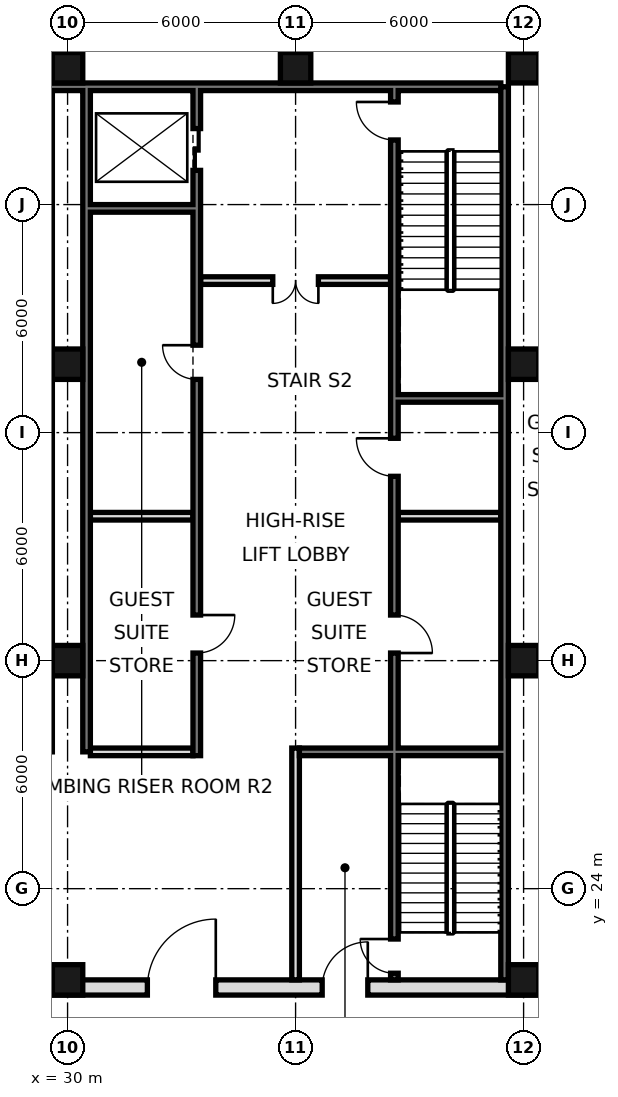
"""IFC4 building model, lengths in metres.
Left out: names, types, materials, properties, quantities, classifications, styles, units other than length and angle.
Written with IfcOpenShell. Run it as: python <this file> out.ifc"""

import sys

from ifc_helpers import new_model, si_unit, direction, frame, frame_2d, origin, origin_2d, place, context, subcontext, project, spatial, rectangle, hollow_rectangle, extrude, element, fill, save


model = new_model("IFC4")
c1 = context("Model", 3, precision=1e-05, world=origin(), true_north=direction((0.0, 1.0)))
c2 = subcontext(c1, "Body", "Model", "MODEL_VIEW")
j1 = project(units=[si_unit("LENGTHUNIT", "METRE"), si_unit("PLANEANGLEUNIT", "RADIAN")], contexts=[c1])
p1 = place(None, origin())
s1 = spatial("IfcSite", under=j1, at=p1, CompositionType="ELEMENT")
p2 = place(p1, origin())
s2 = spatial("IfcBuilding", under=s1, at=p2, CompositionType="ELEMENT")
p3 = place(p2, frame((0.0, 0.0, 30.0)))
s3 = spatial("IfcBuildingStorey", under=s2, at=p3, CompositionType="ELEMENT", Elevation=30.0)
for number, where, z_axis, x_axis in (
    (1, (30.0, 21.6, 0.0), (0.0, 0.0, 1.0), (1.0, 0.0, 0.0)),
    (2, (30.0, 30.0, 0.0), (0.0, 0.0, 1.0), (1.0, 0.0, 0.0)),
    (3, (30.0, 37.8, 0.0), (0.0, 0.0, 1.0), (1.0, 0.0, 0.0)),
    (4, (30.0, 45.6, 0.0), (0.0, 0.0, 1.0), (1.0, 0.0, 0.0)),
    (5, (36.0, 45.6, 0.0), (0.0, 0.0, 1.0), (1.0, 0.0, 0.0)),
    (6, (42.0, 21.6, 0.0), (0.0, 0.0, 1.0), (1.0, 0.0, 0.0)),
    (7, (42.0, 30.0, 0.0), (0.0, 0.0, 1.0), (1.0, 0.0, 0.0)),
    (8, (42.0, 37.8, 0.0), (0.0, 0.0, 1.0), (1.0, 0.0, 0.0)),
    (9, (42.0, 45.6, 0.0), (0.0, 0.0, 1.0), (1.0, 0.0, 0.0)),
):
    element("IfcColumn", number, at=place(p3, frame(where, z_axis=z_axis, x_axis=x_axis)), inside=s3, PredefinedType="COLUMN", context=c2, shape_type="SweptSolid", body=[
        extrude(hollow_rectangle(XDim=0.8, YDim=0.8, WallThickness=0.07, at=origin_2d()), origin(), (0.0, 0.0, 1.0), 4.8),
    ])
p4 = place(p3, frame((41.5, 21.6, 0.0), z_axis=(0.0, 0.0, 1.0), x_axis=(0.0, 1.0, 0.0)))
e10 = element("IfcWall", 10, at=p4, inside=s3, PredefinedType="SOLIDWALL", context=c2, shape_type="SweptSolid", body=[
    extrude(rectangle(XDim=23.5, YDim=0.2, at=frame_2d((11.75, 0.0))), origin(), (0.0, 0.0, 1.0), 4.4),
])
p5 = place(p3, frame((6.6, 45.1, 0.0), z_axis=(0.0, 0.0, 1.0), x_axis=(1.0, 0.0, 0.0)))
e11 = element("IfcWall", 11, at=p5, inside=s3, PredefinedType="SOLIDWALL", context=c2, shape_type="SweptSolid", body=[
    extrude(rectangle(XDim=34.8, YDim=0.2, at=frame_2d((17.4, 0.0))), origin(), (0.0, 0.0, 1.0), 4.4),
])
p6 = place(p3, frame((30.5, 27.6, 0.0), z_axis=(0.0, 0.0, 1.0), x_axis=(0.0, 1.0, 0.0)))
e12 = element("IfcWall", 12, at=p6, inside=s3, PredefinedType="SOLIDWALL", context=c2, shape_type="SweptSolid", body=[
    extrude(rectangle(XDim=17.5, YDim=0.2, at=frame_2d((8.75, 0.0))), origin(), (0.0, 0.0, 1.0), 4.4),
])
p7 = place(p3, frame((5.6, 21.4, 0.0), z_axis=(0.0, 0.0, 1.0), x_axis=(1.0, 0.0, 0.0)))
e13 = element("IfcWall", 13, at=p7, inside=s3, PredefinedType="SOLIDWALL", context=c2, shape_type="SweptSolid", body=[
    extrude(rectangle(XDim=36.8, YDim=0.4, at=frame_2d((18.4, 0.0))), origin(), (0.0, 0.0, 1.0), 4.4),
])
p8 = place(p7, frame((8.5, 0.0, 0.0)))
e14 = element("IfcOpeningElement", 14, at=p8, cuts=e13, PredefinedType="OPENING", context=c2, shape_type="SweptSolid", body=[
    extrude(rectangle(XDim=1.8, YDim=2.1, at=frame_2d((0.9, 1.05))), frame((0.0, 0.21, 0.0), z_axis=(0.0, -1.0, 0.0), x_axis=(1.0, 0.0, 0.0)), (0.0, 0.0, 1.0), 0.42),
])
p9 = place(p7, frame((17.5, 0.0, 0.0)))
e15 = element("IfcOpeningElement", 15, at=p9, cuts=e13, PredefinedType="OPENING", context=c2, shape_type="SweptSolid", body=[
    extrude(rectangle(XDim=1.8, YDim=2.1, at=frame_2d((0.9, 1.05))), frame((0.0, 0.21, 0.0), z_axis=(0.0, -1.0, 0.0), x_axis=(1.0, 0.0, 0.0)), (0.0, 0.0, 1.0), 0.42),
])
p10 = place(p7, frame((26.5, 0.0, 0.0)))
e16 = element("IfcOpeningElement", 16, at=p10, cuts=e13, PredefinedType="OPENING", context=c2, shape_type="SweptSolid", body=[
    extrude(rectangle(XDim=1.8, YDim=2.1, at=frame_2d((0.9, 1.05))), frame((0.0, 0.21, 0.0), z_axis=(0.0, -1.0, 0.0), x_axis=(1.0, 0.0, 0.0)), (0.0, 0.0, 1.0), 0.42),
])
p11 = place(p7, frame((4.5, 0.0, 0.0)))
e17 = element("IfcOpeningElement", 17, at=p11, cuts=e13, PredefinedType="OPENING", context=c2, shape_type="SweptSolid", body=[
    extrude(rectangle(XDim=1.2, YDim=2.1, at=frame_2d((0.6, 1.05))), frame((0.0, 0.21, 0.0), z_axis=(0.0, -1.0, 0.0), x_axis=(1.0, 0.0, 0.0)), (0.0, 0.0, 1.0), 0.42),
])
p12 = place(p7, frame((31.1, 0.0, 0.0)))
e18 = element("IfcOpeningElement", 18, at=p12, cuts=e13, PredefinedType="OPENING", context=c2, shape_type="SweptSolid", body=[
    extrude(rectangle(XDim=1.2, YDim=2.1, at=frame_2d((0.6, 1.05))), frame((0.0, 0.21, 0.0), z_axis=(0.0, -1.0, 0.0), x_axis=(1.0, 0.0, 0.0)), (0.0, 0.0, 1.0), 0.42),
])
p13 = place(p3, frame((33.4, 27.5, 0.0), z_axis=(0.0, 0.0, 1.0), x_axis=(0.0, 1.0, 0.0)))
e19 = element("IfcWall", 19, at=p13, inside=s3, PredefinedType="SOLIDWALL", context=c2, shape_type="SweptSolid", body=[
    extrude(rectangle(XDim=17.5, YDim=0.2, at=frame_2d((8.75, 0.0))), origin(), (0.0, 0.0, 1.0), 4.4),
])
p14 = place(p13, frame((15.4, 0.0, 0.0)))
e20 = element("IfcOpeningElement", 20, at=p14, cuts=e19, PredefinedType="OPENING", context=c2, shape_type="SweptSolid", body=[
    extrude(rectangle(XDim=1.1, YDim=2.1, at=frame_2d((0.55, 1.05))), frame((0.0, 0.11, 0.0), z_axis=(0.0, -1.0, 0.0), x_axis=(1.0, 0.0, 0.0)), (0.0, 0.0, 1.0), 0.22),
])
p15 = place(p13, frame((2.7, 0.0, 0.0)))
e21 = element("IfcOpeningElement", 21, at=p15, cuts=e19, PredefinedType="OPENING", context=c2, shape_type="SweptSolid", body=[
    extrude(rectangle(XDim=1.0, YDim=2.1, at=frame_2d((0.5, 1.05))), frame((0.0, 0.11, 0.0), z_axis=(0.0, -1.0, 0.0), x_axis=(1.0, 0.0, 0.0)), (0.0, 0.0, 1.0), 0.22),
])
p16 = place(p13, frame((9.9, 0.0, 0.0)))
e22 = element("IfcOpeningElement", 22, at=p16, cuts=e19, PredefinedType="OPENING", context=c2, shape_type="SweptSolid", body=[
    extrude(rectangle(XDim=0.9, YDim=2.1, at=frame_2d((0.45, 1.05))), frame((0.0, 0.11, 0.0), z_axis=(0.0, -1.0, 0.0), x_axis=(1.0, 0.0, 0.0)), (0.0, 0.0, 1.0), 0.22),
])
p17 = place(p3, frame((36.0, 21.6, 0.0), z_axis=(0.0, 0.0, 1.0), x_axis=(0.0, 1.0, 0.0)))
e23 = element("IfcWall", 23, at=p17, inside=s3, PredefinedType="PARTITIONING", context=c2, shape_type="SweptSolid", body=[
    extrude(rectangle(XDim=6.1, YDim=0.2, at=frame_2d((3.05, 0.0))), origin(), (0.0, 0.0, 1.0), 4.4),
])
p18 = place(p3, frame((38.6, 21.6, 0.0), z_axis=(0.0, 0.0, 1.0), x_axis=(0.0, 1.0, 0.0)))
e24 = element("IfcWall", 24, at=p18, inside=s3, PredefinedType="SOLIDWALL", context=c2, shape_type="SweptSolid", body=[
    extrude(rectangle(XDim=23.4, YDim=0.2, at=frame_2d((11.7, 0.0))), origin(), (0.0, 0.0, 1.0), 4.4),
])
p19 = place(p18, frame((8.6, 0.0, 0.0)))
e25 = element("IfcOpeningElement", 25, at=p19, cuts=e24, PredefinedType="OPENING", context=c2, shape_type="SweptSolid", body=[
    extrude(rectangle(XDim=1.0, YDim=2.1, at=frame_2d((0.5, 1.05))), frame((0.0, 0.11, 0.0), z_axis=(0.0, -1.0, 0.0), x_axis=(1.0, 0.0, 0.0)), (0.0, 0.0, 1.0), 0.22),
])
p20 = place(p18, frame((13.25, 0.0, 0.0)))
e26 = element("IfcOpeningElement", 26, at=p20, cuts=e24, PredefinedType="OPENING", context=c2, shape_type="SweptSolid", body=[
    extrude(rectangle(XDim=1.0, YDim=2.1, at=frame_2d((0.5, 1.05))), frame((0.0, 0.11, 0.0), z_axis=(0.0, -1.0, 0.0), x_axis=(1.0, 0.0, 0.0)), (0.0, 0.0, 1.0), 0.22),
])
p21 = place(p18, frame((22.1, 0.0, 0.0)))
e27 = element("IfcOpeningElement", 27, at=p21, cuts=e24, PredefinedType="OPENING", context=c2, shape_type="SweptSolid", body=[
    extrude(rectangle(XDim=1.0, YDim=2.1, at=frame_2d((0.5, 1.05))), frame((0.0, 0.11, 0.0), z_axis=(0.0, -1.0, 0.0), x_axis=(1.0, 0.0, 0.0)), (0.0, 0.0, 1.0), 0.22),
])
p22 = place(p18, frame((0.175, 0.0, 0.0)))
e28 = element("IfcOpeningElement", 28, at=p22, cuts=e24, PredefinedType="OPENING", context=c2, shape_type="SweptSolid", body=[
    extrude(rectangle(XDim=0.9, YDim=2.1, at=frame_2d((0.45, 1.05))), frame((0.0, 0.11, 0.0), z_axis=(0.0, -1.0, 0.0), x_axis=(1.0, 0.0, 0.0)), (0.0, 0.0, 1.0), 0.22),
])
p23 = place(p3, frame((30.6, 27.6, 0.0), z_axis=(0.0, 0.0, 1.0), x_axis=(1.0, 0.0, 0.0)))
e29 = element("IfcWall", 29, at=p23, inside=s3, PredefinedType="PARTITIONING", context=c2, shape_type="SweptSolid", body=[
    extrude(rectangle(XDim=2.7, YDim=0.2, at=frame_2d((1.35, 0.0))), origin(), (0.0, 0.0, 1.0), 4.4),
])
p24 = place(p3, frame((36.1, 27.6, 0.0), z_axis=(0.0, 0.0, 1.0), x_axis=(1.0, 0.0, 0.0)))
e30 = element("IfcWall", 30, at=p24, inside=s3, PredefinedType="SOLIDWALL", context=c2, shape_type="SweptSolid", body=[
    extrude(rectangle(XDim=5.3, YDim=0.2, at=frame_2d((2.65, 0.0))), origin(), (0.0, 0.0, 1.0), 4.4),
])
p25 = place(p3, frame((30.6, 33.8, 0.0), z_axis=(0.0, 0.0, 1.0), x_axis=(1.0, 0.0, 0.0)))
e31 = element("IfcWall", 31, at=p25, inside=s3, PredefinedType="SOLIDWALL", context=c2, shape_type="SweptSolid", body=[
    extrude(rectangle(XDim=2.7, YDim=0.2, at=frame_2d((1.35, 0.0))), origin(), (0.0, 0.0, 1.0), 4.4),
])
p26 = place(p3, frame((38.7, 33.8, 0.0), z_axis=(0.0, 0.0, 1.0), x_axis=(1.0, 0.0, 0.0)))
e32 = element("IfcWall", 32, at=p26, inside=s3, PredefinedType="PARTITIONING", context=c2, shape_type="SweptSolid", body=[
    extrude(rectangle(XDim=2.7, YDim=0.2, at=frame_2d((1.35, 0.0))), origin(), (0.0, 0.0, 1.0), 4.4),
])
p27 = place(p3, frame((38.7, 36.9, 0.0), z_axis=(0.0, 0.0, 1.0), x_axis=(1.0, 0.0, 0.0)))
e33 = element("IfcWall", 33, at=p27, inside=s3, PredefinedType="SOLIDWALL", context=c2, shape_type="SweptSolid", body=[
    extrude(rectangle(XDim=2.7, YDim=0.2, at=frame_2d((1.35, 0.0))), origin(), (0.0, 0.0, 1.0), 4.4),
])
p28 = place(p3, frame((33.5, 40.0, 0.0), z_axis=(0.0, 0.0, 1.0), x_axis=(1.0, 0.0, 0.0)))
e34 = element("IfcWall", 34, at=p28, inside=s3, PredefinedType="PARTITIONING", context=c2, shape_type="SweptSolid", body=[
    extrude(rectangle(XDim=5.0, YDim=0.2, at=frame_2d((2.5, 0.0))), origin(), (0.0, 0.0, 1.0), 4.4),
])
p29 = place(p28, frame((1.9, 0.0, 0.0)))
e35 = element("IfcOpeningElement", 35, at=p29, cuts=e34, PredefinedType="OPENING", context=c2, shape_type="SweptSolid", body=[
    extrude(rectangle(XDim=1.2, YDim=2.1, at=frame_2d((0.6, 1.05))), frame((0.0, 0.11, 0.0), z_axis=(0.0, -1.0, 0.0), x_axis=(1.0, 0.0, 0.0)), (0.0, 0.0, 1.0), 0.22),
])
p30 = place(p3, frame((30.6, 41.9, 0.0), z_axis=(0.0, 0.0, 1.0), x_axis=(1.0, 0.0, 0.0)))
e36 = element("IfcWall", 36, at=p30, inside=s3, PredefinedType="SOLIDWALL", context=c2, shape_type="SweptSolid", body=[
    extrude(rectangle(XDim=2.7, YDim=0.2, at=frame_2d((1.35, 0.0))), origin(), (0.0, 0.0, 1.0), 4.4),
])
p31 = place(p10, frame((1.8, 0.0, 0.0), z_axis=(0.0, 0.0, 1.0), x_axis=(-1.0, 0.0, 0.0)))
e37 = element("IfcDoor", 37, at=p31, inside=s3, OperationType="SINGLE_SWING_LEFT", PredefinedType="DOOR", context=c2, shape_type="SweptSolid", body=[
    extrude(rectangle(XDim=1.8, YDim=2.1, at=frame_2d((0.9, 1.05))), frame((0.0, 0.025, 0.0), z_axis=(0.0, -1.0, 0.0), x_axis=(1.0, 0.0, 0.0)), (0.0, 0.0, 1.0), 0.05),
])
fill(e16, e37)
p32 = place(p12, frame((1.2, 0.0, 0.0), z_axis=(0.0, 0.0, 1.0), x_axis=(-1.0, 0.0, 0.0)))
e38 = element("IfcDoor", 38, at=p32, inside=s3, OperationType="SINGLE_SWING_LEFT", PredefinedType="DOOR", context=c2, shape_type="SweptSolid", body=[
    extrude(rectangle(XDim=1.2, YDim=2.1, at=frame_2d((0.6, 1.05))), frame((0.0, 0.025, 0.0), z_axis=(0.0, -1.0, 0.0), x_axis=(1.0, 0.0, 0.0)), (0.0, 0.0, 1.0), 0.05),
])
fill(e18, e38)
p33 = place(p29, frame((1.2, 0.0, 0.0), z_axis=(0.0, 0.0, 1.0), x_axis=(-1.0, 0.0, 0.0)))
e39 = element("IfcDoor", 39, at=p33, inside=s3, OperationType="DOUBLE_DOOR_SINGLE_SWING", PredefinedType="DOOR", context=c2, shape_type="SweptSolid", body=[
    extrude(rectangle(XDim=1.2, YDim=2.1, at=frame_2d((0.6, 1.05))), frame((0.0, 0.025, 0.0), z_axis=(0.0, -1.0, 0.0), x_axis=(1.0, 0.0, 0.0)), (0.0, 0.0, 1.0), 0.05),
])
fill(e35, e39)
p34 = place(p14, origin())
e40 = element("IfcDoor", 40, at=p34, inside=s3, OperationType="DOUBLE_DOOR_SLIDING", PredefinedType="DOOR", context=c2, shape_type="SweptSolid", body=[
    extrude(rectangle(XDim=1.1, YDim=2.1, at=frame_2d((0.55, 1.05))), frame((0.0, 0.025, 0.0), z_axis=(0.0, -1.0, 0.0), x_axis=(1.0, 0.0, 0.0)), (0.0, 0.0, 1.0), 0.05),
])
fill(e20, e40)
p35 = place(p19, frame((1.0, 0.0, 0.0), z_axis=(0.0, 0.0, 1.0), x_axis=(-1.0, 0.0, 0.0)))
e41 = element("IfcDoor", 41, at=p35, inside=s3, OperationType="SINGLE_SWING_RIGHT", PredefinedType="DOOR", context=c2, shape_type="SweptSolid", body=[
    extrude(rectangle(XDim=1.0, YDim=2.1, at=frame_2d((0.5, 1.05))), frame((0.0, 0.025, 0.0), z_axis=(0.0, -1.0, 0.0), x_axis=(1.0, 0.0, 0.0)), (0.0, 0.0, 1.0), 0.05),
])
fill(e25, e41)
p36 = place(p20, frame((1.0, 0.0, 0.0), z_axis=(0.0, 0.0, 1.0), x_axis=(-1.0, 0.0, 0.0)))
e42 = element("IfcDoor", 42, at=p36, inside=s3, OperationType="SINGLE_SWING_LEFT", PredefinedType="DOOR", context=c2, shape_type="SweptSolid", body=[
    extrude(rectangle(XDim=1.0, YDim=2.1, at=frame_2d((0.5, 1.05))), frame((0.0, 0.025, 0.0), z_axis=(0.0, -1.0, 0.0), x_axis=(1.0, 0.0, 0.0)), (0.0, 0.0, 1.0), 0.05),
])
fill(e26, e42)
p37 = place(p15, origin())
e43 = element("IfcDoor", 43, at=p37, inside=s3, OperationType="SINGLE_SWING_RIGHT", PredefinedType="DOOR", context=c2, shape_type="SweptSolid", body=[
    extrude(rectangle(XDim=1.0, YDim=2.1, at=frame_2d((0.5, 1.05))), frame((0.0, 0.025, 0.0), z_axis=(0.0, -1.0, 0.0), x_axis=(1.0, 0.0, 0.0)), (0.0, 0.0, 1.0), 0.05),
])
fill(e21, e43)
p38 = place(p21, frame((1.0, 0.0, 0.0), z_axis=(0.0, 0.0, 1.0), x_axis=(-1.0, 0.0, 0.0)))
e44 = element("IfcDoor", 44, at=p38, inside=s3, OperationType="SINGLE_SWING_LEFT", PredefinedType="DOOR", context=c2, shape_type="SweptSolid", body=[
    extrude(rectangle(XDim=1.0, YDim=2.1, at=frame_2d((0.5, 1.05))), frame((0.0, 0.025, 0.0), z_axis=(0.0, -1.0, 0.0), x_axis=(1.0, 0.0, 0.0)), (0.0, 0.0, 1.0), 0.05),
])
fill(e27, e44)
p39 = place(p22, frame((0.9, 0.0, 0.0), z_axis=(0.0, 0.0, 1.0), x_axis=(-1.0, 0.0, 0.0)))
e45 = element("IfcDoor", 45, at=p39, inside=s3, OperationType="SINGLE_SWING_LEFT", PredefinedType="DOOR", context=c2, shape_type="SweptSolid", body=[
    extrude(rectangle(XDim=0.9, YDim=2.1, at=frame_2d((0.45, 1.05))), frame((0.0, 0.025, 0.0), z_axis=(0.0, -1.0, 0.0), x_axis=(1.0, 0.0, 0.0)), (0.0, 0.0, 1.0), 0.05),
])
fill(e28, e45)
p40 = place(p16, frame((0.9, 0.0, 0.0), z_axis=(0.0, 0.0, 1.0), x_axis=(-1.0, 0.0, 0.0)))
e46 = element("IfcDoor", 46, at=p40, inside=s3, OperationType="SINGLE_SWING_LEFT", PredefinedType="DOOR", context=c2, shape_type="SweptSolid", body=[
    extrude(rectangle(XDim=0.9, YDim=2.1, at=frame_2d((0.45, 1.05))), frame((0.0, 0.025, 0.0), z_axis=(0.0, -1.0, 0.0), x_axis=(1.0, 0.0, 0.0)), (0.0, 0.0, 1.0), 0.05),
])
fill(e22, e46)
save(model, sys.argv[1])
